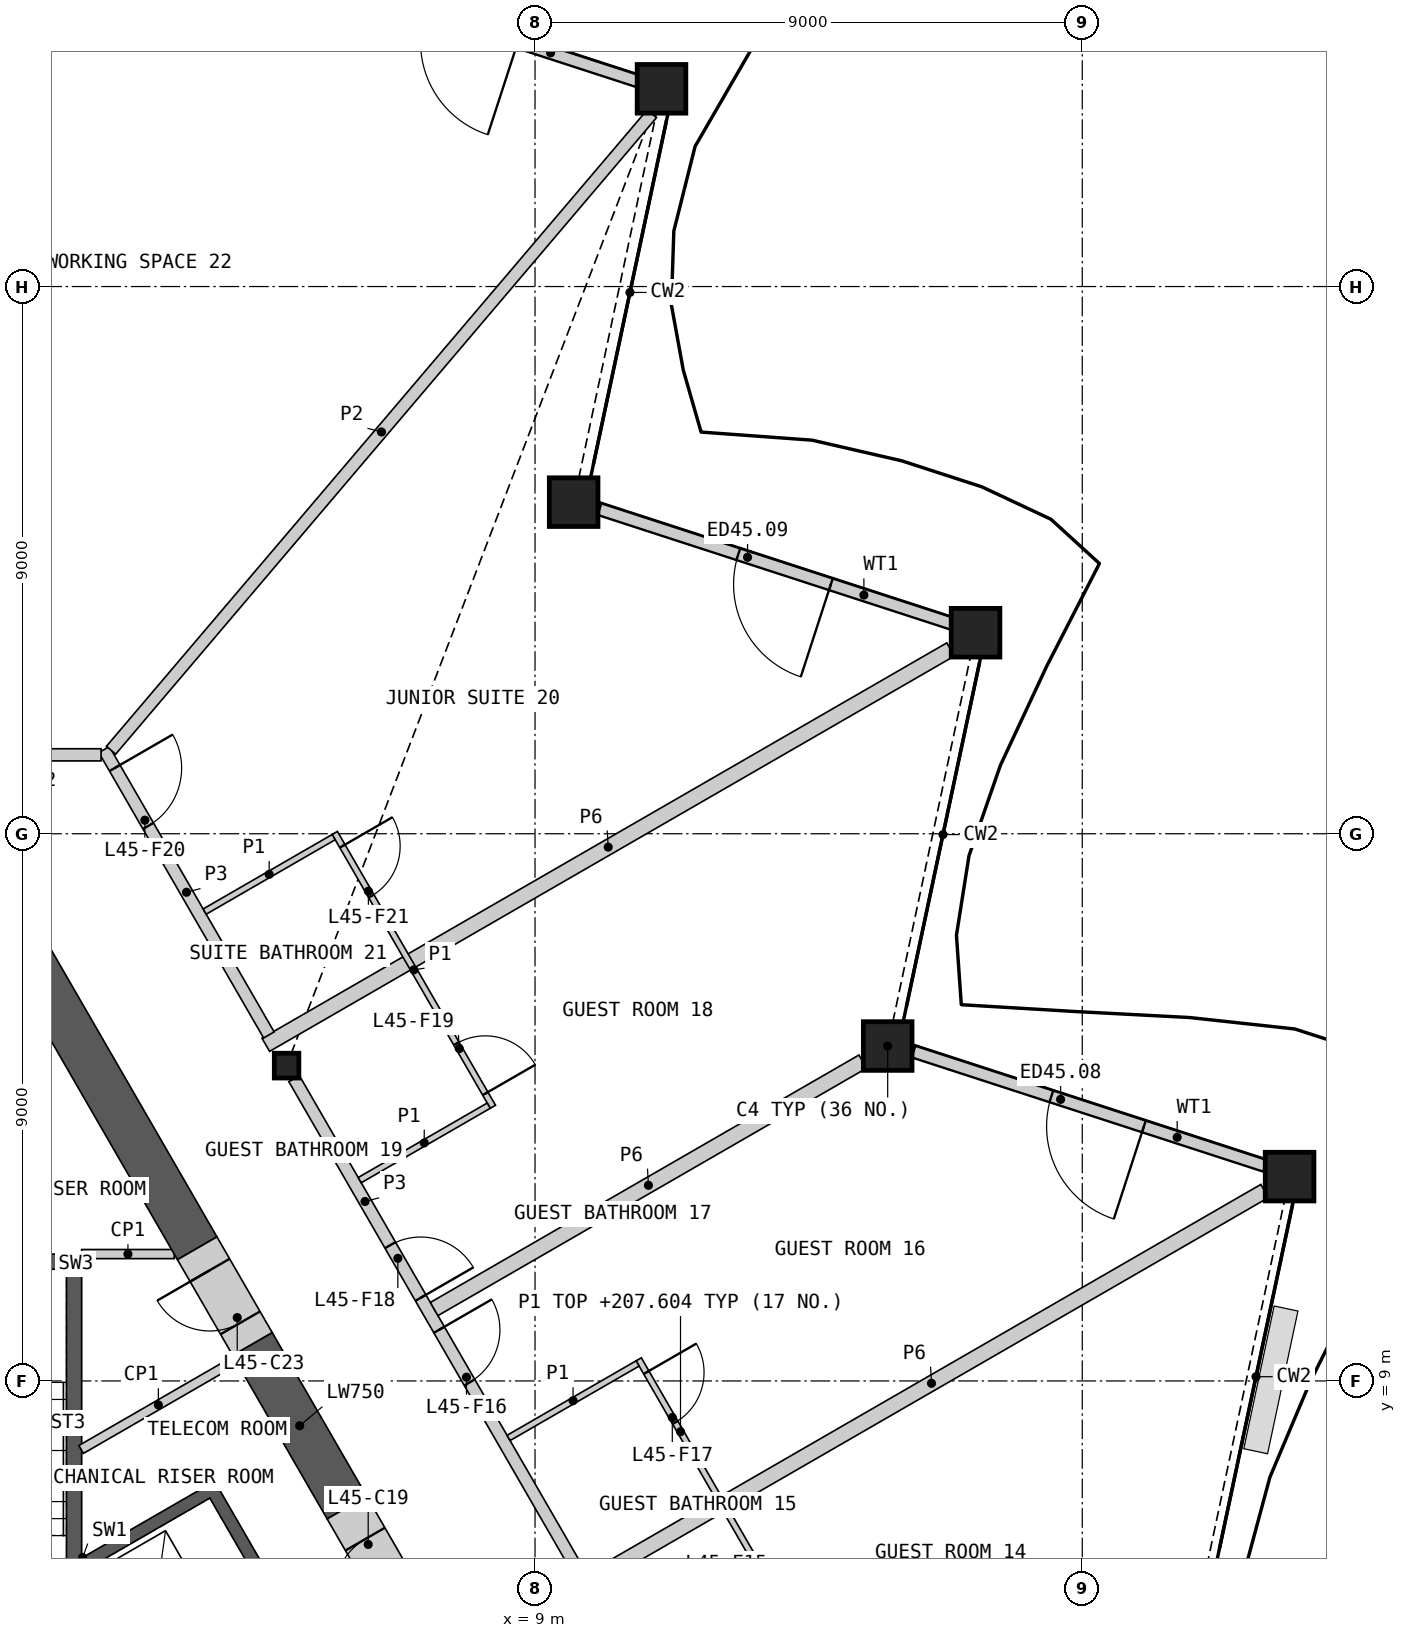
"""IFC4 building model, lengths in metres.
Left out: names, types, materials, properties, quantities, classifications, styles, units other than length and angle.
Written with IfcOpenShell. Run it as: python <this file> out.ifc"""

import sys

from ifc_helpers import new_model, si_unit, direction, frame, frame_2d, origin, origin_2d, place, context, subcontext, project, spatial, polyline, rectangle, hollow_rectangle, i_section, outline, extrude, element, fill, save


model = new_model("IFC4")
c1 = context("Model", 3, precision=1e-05, world=origin(), true_north=direction((0.0, 1.0)))
c2 = subcontext(c1, "Body", "Model", "MODEL_VIEW")
j1 = project(units=[si_unit("LENGTHUNIT", "METRE"), si_unit("PLANEANGLEUNIT", "RADIAN")], contexts=[c1])
p1 = place(None, origin())
s1 = spatial("IfcSite", under=j1, at=p1, CompositionType="ELEMENT")
p2 = place(p1, origin())
s2 = spatial("IfcBuilding", under=s1, at=p2, CompositionType="ELEMENT")
p3 = place(p2, frame((0.0, 0.0, 205.2)))
s3 = spatial("IfcBuildingStorey", under=s2, at=p3, CompositionType="ELEMENT", Elevation=205.2)
for number, where, z_axis, x_axis in (
    (1, (21.409, 12.361, 0.0), (0.0, 0.0, 1.0), (1.0, 0.0, 0.0)),
    (2, (14.8, 14.508, 0.0), (0.0, 0.0, 1.0), (1.0, 0.0, 0.0)),
    (3, (16.245, 21.306, 0.0), (0.0, 0.0, 1.0), (1.0, 0.0, 0.0)),
    (4, (9.635, 23.454, 0.0), (0.0, 0.0, 1.0), (1.0, 0.0, 0.0)),
    (5, (11.08, 30.252, 0.0), (0.0, 0.0, 1.0), (1.0, 0.0, 0.0)),
):
    element("IfcColumn", number, at=place(p3, frame(where, z_axis=z_axis, x_axis=x_axis)), inside=s3, PredefinedType="COLUMN", context=c2, shape_type="SweptSolid", body=[
        extrude(hollow_rectangle(XDim=0.8, YDim=0.8, WallThickness=0.05, at=origin_2d()), origin(), (0.0, 0.0, 1.0), 3.6),
    ])
p4 = place(p3, frame((4.914, 14.186, 0.0), z_axis=(0.0, 0.0, 1.0), x_axis=(1.0, 0.0, 0.0)))
e6 = element("IfcColumn", 6, at=p4, inside=s3, PredefinedType="COLUMN", context=c2, shape_type="SweptSolid", body=[
    extrude(i_section(OverallWidth=0.404, OverallDepth=0.407, WebThickness=0.027, FlangeThickness=0.044, at=origin_2d()), origin(), (0.0, 0.0, 1.0), 3.6),
])
p5 = place(p3, frame((21.006, 12.538, 0.0), z_axis=(0.0, 0.0, 1.0), x_axis=(-0.951049709595, 0.309037942458, 0.0)))
e7 = element("IfcWall", 7, at=p5, inside=s3, PredefinedType="SOLIDWALL", context=c2, shape_type="SweptSolid", body=[
    extrude(rectangle(XDim=6.079, YDim=0.2, at=frame_2d((3.04, 0.0))), origin(), (0.0, 0.0, 1.0), 2.701),
])
p6 = place(p5, frame((2.096, 0.0, 0.0)))
e8 = element("IfcOpeningElement", 8, at=p6, cuts=e7, PredefinedType="OPENING", context=c2, shape_type="SweptSolid", body=[
    extrude(rectangle(XDim=1.6, YDim=2.4, at=frame_2d((0.8, 1.2))), frame((0.0, 0.11, 0.0), z_axis=(0.0, -1.0, 0.0), x_axis=(1.0, 0.0, 0.0)), (0.0, 0.0, 1.0), 0.22),
])
p7 = place(p3, frame((15.858, 21.455, 0.0), z_axis=(0.0, 0.0, 1.0), x_axis=(-0.951066434465, 0.308986467719, 0.0)))
e9 = element("IfcWall", 9, at=p7, inside=s3, PredefinedType="SOLIDWALL", context=c2, shape_type="SweptSolid", body=[
    extrude(rectangle(XDim=6.097, YDim=0.2, at=frame_2d((3.048, 0.0))), origin(), (0.0, 0.0, 1.0), 2.701),
])
p8 = place(p7, frame((2.096, 0.0, 0.0)))
e10 = element("IfcOpeningElement", 10, at=p8, cuts=e9, PredefinedType="OPENING", context=c2, shape_type="SweptSolid", body=[
    extrude(rectangle(XDim=1.6, YDim=2.4, at=frame_2d((0.8, 1.2))), frame((0.0, 0.11, 0.0), z_axis=(0.0, -1.0, 0.0), x_axis=(1.0, 0.0, 0.0)), (0.0, 0.0, 1.0), 0.22),
])
p9 = place(p3, frame((10.71, 30.371, 0.0), z_axis=(0.0, 0.0, 1.0), x_axis=(-0.951055780789, 0.30901925802, 0.0)))
e11 = element("IfcWall", 11, at=p9, inside=s3, PredefinedType="SOLIDWALL", context=c2, shape_type="SweptSolid", body=[
    extrude(rectangle(XDim=6.114, YDim=0.2, at=frame_2d((3.057, 0.0))), origin(), (0.0, 0.0, 1.0), 2.701),
])
p10 = place(p9, frame((2.096, 0.0, 0.0)))
e12 = element("IfcOpeningElement", 12, at=p10, cuts=e11, PredefinedType="OPENING", context=c2, shape_type="SweptSolid", body=[
    extrude(rectangle(XDim=1.6, YDim=2.4, at=frame_2d((0.8, 1.2))), frame((0.0, 0.11, 0.0), z_axis=(0.0, -1.0, 0.0), x_axis=(1.0, 0.0, 0.0)), (0.0, 0.0, 1.0), 0.22),
])
p11 = place(p3, origin())
e13 = element("IfcWall", 13, at=p11, inside=s3, PredefinedType="SHEAR", context=c2, shape_type="SweptSolid", body=[
    extrude(outline(polyline([(1.561, 6.097), (3.731, 7.35), (7.131, 1.461), (4.96, 0.208), (4.861, 0.381), (6.852, 1.531), (4.752, 5.169), (2.76, 4.019), (2.66, 4.192), (4.652, 5.342), (3.652, 7.074), (1.66, 5.924), (1.561, 6.097)])), origin(), (0.0, 0.0, 1.0), 3.25),
])
p12 = place(p3, origin())
e14 = element("IfcWall", 14, at=p12, inside=s3, PredefinedType="SHEAR", context=c2, shape_type="SweptSolid", body=[
    extrude(outline(polyline([(1.544, 5.237), (1.544, 11.087), (1.294, 10.837), (1.294, 5.237), (1.544, 5.237)])), origin(), (0.0, 0.0, 1.0), 3.25),
])
p13 = place(p3, origin())
e15 = element("IfcWall", 15, at=p13, inside=s3, PredefinedType="SHEAR", context=c2, shape_type="SweptSolid", body=[
    extrude(outline(polyline([(1.544, 11.087), (-1.544, 11.087), (-1.294, 10.837), (1.294, 10.837), (1.544, 11.087)])), origin(), (0.0, 0.0, 1.0), 3.25),
])
p14 = place(p3, frame((4.075, 9.339, 0.0), z_axis=(0.0, 0.0, 1.0), x_axis=(-0.865995658863, -0.500051516177, 0.0)))
e16 = element("IfcWall", 16, at=p14, inside=s3, PredefinedType="PARTITIONING", context=c2, shape_type="SweptSolid", body=[
    extrude(rectangle(XDim=2.933, YDim=0.15, at=frame_2d((1.466, 0.0))), origin(), (0.0, 0.0, 1.0), 3.25),
])
p15 = place(p3, frame((1.544, 11.087, 0.0), z_axis=(0.0, 0.0, 1.0), x_axis=(1.0, 0.0, 0.0)))
e17 = element("IfcWall", 17, at=p15, inside=s3, PredefinedType="PARTITIONING", context=c2, shape_type="SweptSolid", body=[
    extrude(rectangle(XDim=1.522, YDim=0.15, at=frame_2d((0.761, 0.0))), origin(), (0.0, 0.0, 1.0), 3.25),
])
p16 = place(p3, frame((3.444, 11.182, 0.0), z_axis=(0.0, 0.0, 1.0), x_axis=(-0.499985517215, 0.866033765263, 0.0)))
e18 = element("IfcWall", 18, at=p16, inside=s3, PredefinedType="SHEAR", context=c2, shape_type="SweptSolid", body=[
    extrude(rectangle(XDim=6.24, YDim=0.75, at=frame_2d((3.12, 0.0))), origin(), (0.0, 0.0, 1.0), 3.25),
])
p17 = place(p3, frame((5.906, 6.918, 0.0), z_axis=(0.0, 0.0, 1.0), x_axis=(-0.500017123375, 0.866015517374, 0.0)))
e19 = element("IfcWall", 19, at=p17, inside=s3, PredefinedType="SHEAR", context=c2, shape_type="SweptSolid", body=[
    extrude(rectangle(XDim=3.108, YDim=0.75, at=frame_2d((1.554, 0.0))), origin(), (0.0, 0.0, 1.0), 3.25),
])
p18 = place(p3, frame((7.006, 5.012, 0.0), z_axis=(0.0, 0.0, 1.0), x_axis=(-0.499946605688, 0.86605622881, 0.0)))
e20 = element("IfcWall", 20, at=p18, inside=s3, PredefinedType="SHEAR", context=c2, shape_type="SweptSolid", body=[
    extrude(rectangle(XDim=2.2, YDim=0.75, at=frame_2d((1.1, 0.0))), origin(), (0.0, 0.0, 1.0), 3.25),
])
p19 = place(p18, frame((0.6, 0.0, 0.0)))
e21 = element("IfcOpeningElement", 21, at=p19, cuts=e20, PredefinedType="OPENING", context=c2, shape_type="SweptSolid", body=[
    extrude(rectangle(XDim=1.0, YDim=2.1, at=frame_2d((0.5, 1.05))), frame((0.0, 0.385, 0.0), z_axis=(0.0, -1.0, 0.0), x_axis=(1.0, 0.0, 0.0)), (0.0, 0.0, 1.0), 0.77),
])
p20 = place(p3, frame((4.353, 9.609, 0.0), z_axis=(0.0, 0.0, 1.0), x_axis=(-0.500071537347, 0.865984097738, 0.0)))
e22 = element("IfcWall", 22, at=p20, inside=s3, PredefinedType="SHEAR", context=c2, shape_type="SweptSolid", body=[
    extrude(rectangle(XDim=1.816, YDim=0.75, at=frame_2d((0.908, 0.0))), origin(), (0.0, 0.0, 1.0), 3.25),
])
p21 = place(p20, frame((0.4, 0.0, 0.0)))
e23 = element("IfcOpeningElement", 23, at=p21, cuts=e22, PredefinedType="OPENING", context=c2, shape_type="SweptSolid", body=[
    extrude(rectangle(XDim=1.0, YDim=2.1, at=frame_2d((0.5, 1.05))), frame((0.0, 0.385, 0.0), z_axis=(0.0, -1.0, 0.0), x_axis=(1.0, 0.0, 0.0)), (0.0, 0.0, 1.0), 0.77),
])
p22 = place(p3, frame((4.572, 14.529, 0.0), z_axis=(0.0, 0.0, 1.0), x_axis=(0.866023333059, 0.500003586584, 0.0)))
e24 = element("IfcWall", 24, at=p22, inside=s3, PredefinedType="PARTITIONING", context=c2, shape_type="SweptSolid", body=[
    extrude(rectangle(XDim=13.005, YDim=0.25, at=frame_2d((6.502, 0.0))), origin(), (0.0, 0.0, 1.0), 2.404),
])
p23 = place(p3, frame((10.042, 5.798, 0.0), z_axis=(0.0, 0.0, 1.0), x_axis=(0.866025883649, 0.499999168849, 0.0)))
e25 = element("IfcWall", 25, at=p23, inside=s3, PredefinedType="PARTITIONING", context=c2, shape_type="SweptSolid", body=[
    extrude(rectangle(XDim=12.652, YDim=0.25, at=frame_2d((6.326, 0.0))), origin(), (0.0, 0.0, 1.0), 2.404),
])
p24 = place(p3, frame((5.038, 13.972, 0.0), z_axis=(0.0, 0.0, 1.0), x_axis=(0.50000393355, -0.866023132736, 0.0)))
e26 = element("IfcWall", 26, at=p24, inside=s3, PredefinedType="PARTITIONING", context=c2, shape_type="SweptSolid", body=[
    extrude(rectangle(XDim=9.335, YDim=0.2, at=frame_2d((4.667, 0.0))), origin(), (0.0, 0.0, 1.0), 3.25),
])
p25 = place(p24, frame((4.77, 0.0, 0.0)))
e27 = element("IfcOpeningElement", 27, at=p25, cuts=e26, PredefinedType="OPENING", context=c2, shape_type="SweptSolid", body=[
    extrude(rectangle(XDim=1.0, YDim=2.1, at=frame_2d((0.5, 1.05))), frame((0.0, 0.11, 0.0), z_axis=(0.0, -1.0, 0.0), x_axis=(1.0, 0.0, 0.0)), (0.0, 0.0, 1.0), 0.22),
])
p26 = place(p24, frame((3.163, 0.0, 0.0)))
e28 = element("IfcOpeningElement", 28, at=p26, cuts=e26, PredefinedType="OPENING", context=c2, shape_type="SweptSolid", body=[
    extrude(rectangle(XDim=1.0, YDim=2.1, at=frame_2d((0.5, 1.05))), frame((0.0, 0.11, 0.0), z_axis=(0.0, -1.0, 0.0), x_axis=(1.0, 0.0, 0.0)), (0.0, 0.0, 1.0), 0.22),
])
p27 = place(p3, frame((7.341, 10.183, 0.0), z_axis=(0.0, 0.0, 1.0), x_axis=(0.866028741424, 0.499994218994, 0.0)))
e29 = element("IfcWall", 29, at=p27, inside=s3, PredefinedType="PARTITIONING", context=c2, shape_type="SweptSolid", body=[
    extrude(rectangle(XDim=8.139, YDim=0.25, at=frame_2d((4.07, 0.0))), origin(), (0.0, 0.0, 1.0), 2.404),
])
p28 = place(p3, frame((1.913, 19.385, 0.0), z_axis=(0.0, 0.0, 1.0), x_axis=(0.499961611314, -0.866047566368, 0.0)))
e30 = element("IfcWall", 30, at=p28, inside=s3, PredefinedType="PARTITIONING", context=c2, shape_type="SweptSolid", body=[
    extrude(rectangle(XDim=5.42, YDim=0.2, at=frame_2d((2.71, 0.0))), origin(), (0.0, 0.0, 1.0), 3.25),
])
p29 = place(p28, frame((0.351, 0.0, 0.0)))
e31 = element("IfcOpeningElement", 31, at=p29, cuts=e30, PredefinedType="OPENING", context=c2, shape_type="SweptSolid", body=[
    extrude(rectangle(XDim=1.1, YDim=2.1, at=frame_2d((0.55, 1.05))), frame((0.0, 0.11, 0.0), z_axis=(0.0, -1.0, 0.0), x_axis=(1.0, 0.0, 0.0)), (0.0, 0.0, 1.0), 0.22),
])
p30 = place(p3, frame((-1.863, 19.298, 0.0), z_axis=(0.0, 0.0, 1.0), x_axis=(1.0, 0.0, 0.0)))
e32 = element("IfcWall", 32, at=p30, inside=s3, PredefinedType="PARTITIONING", context=c2, shape_type="SweptSolid", body=[
    extrude(rectangle(XDim=3.726, YDim=0.2, at=frame_2d((1.863, 0.0))), origin(), (0.0, 0.0, 1.0), 3.25),
])
p31 = place(p30, frame((0.963, 0.0, 0.0)))
e33 = element("IfcOpeningElement", 33, at=p31, cuts=e32, PredefinedType="OPENING", context=c2, shape_type="SweptSolid", body=[
    extrude(rectangle(XDim=1.8, YDim=2.1, at=frame_2d((0.9, 1.05))), frame((0.0, 0.11, 0.0), z_axis=(0.0, -1.0, 0.0), x_axis=(1.0, 0.0, 0.0)), (0.0, 0.0, 1.0), 0.22),
])
p32 = place(p3, frame((2.028, 19.374, 0.0), z_axis=(0.0, 0.0, 1.0), x_axis=(0.647497756192, 0.762067356423, 0.0)))
e34 = element("IfcWall", 34, at=p32, inside=s3, PredefinedType="PARTITIONING", context=c2, shape_type="SweptSolid", body=[
    extrude(rectangle(XDim=13.736, YDim=0.2, at=frame_2d((6.868, 0.0))), origin(), (0.0, 0.0, 1.0), 2.404),
])
p33 = place(p3, frame((10.705, 9.356, 0.0), z_axis=(0.0, 0.0, 1.0), x_axis=(0.500015767406, -0.866016300277, 0.0)))
e35 = element("IfcWall", 35, at=p33, inside=s3, PredefinedType="PARTITIONING", context=c2, shape_type="SweptSolid", body=[
    extrude(rectangle(XDim=5.5, YDim=0.1, at=frame_2d((2.75, 0.0))), origin(), (0.0, 0.0, 1.0), 2.404),
])
p34 = place(p33, frame((4.3, 0.0, 0.0)))
e36 = element("IfcOpeningElement", 36, at=p34, cuts=e35, PredefinedType="OPENING", context=c2, shape_type="SweptSolid", body=[
    extrude(rectangle(XDim=0.95, YDim=2.1, at=frame_2d((0.475, 1.05))), frame((0.0, 0.06, 0.0), z_axis=(0.0, -1.0, 0.0), x_axis=(1.0, 0.0, 0.0)), (0.0, 0.0, 1.0), 0.12),
])
p35 = place(p33, frame((0.25, 0.0, 0.0)))
e37 = element("IfcOpeningElement", 37, at=p35, cuts=e35, PredefinedType="OPENING", context=c2, shape_type="SweptSolid", body=[
    extrude(rectangle(XDim=0.95, YDim=2.1, at=frame_2d((0.475, 1.05))), frame((0.0, 0.06, 0.0), z_axis=(0.0, -1.0, 0.0), x_axis=(1.0, 0.0, 0.0)), (0.0, 0.0, 1.0), 0.12),
])
p36 = place(p3, frame((5.707, 18.013, 0.0), z_axis=(0.0, 0.0, 1.0), x_axis=(0.500006934395, -0.866021400173, 0.0)))
e38 = element("IfcWall", 38, at=p36, inside=s3, PredefinedType="PARTITIONING", context=c2, shape_type="SweptSolid", body=[
    extrude(rectangle(XDim=5.2, YDim=0.1, at=frame_2d((2.6, 0.0))), origin(), (0.0, 0.0, 1.0), 2.404),
])
p37 = place(p36, frame((4.0, 0.0, 0.0)))
e39 = element("IfcOpeningElement", 39, at=p37, cuts=e38, PredefinedType="OPENING", context=c2, shape_type="SweptSolid", body=[
    extrude(rectangle(XDim=0.95, YDim=2.1, at=frame_2d((0.475, 1.05))), frame((0.0, 0.06, 0.0), z_axis=(0.0, -1.0, 0.0), x_axis=(1.0, 0.0, 0.0)), (0.0, 0.0, 1.0), 0.12),
])
p38 = place(p36, frame((0.25, 0.0, 0.0)))
e40 = element("IfcOpeningElement", 40, at=p38, cuts=e38, PredefinedType="OPENING", context=c2, shape_type="SweptSolid", body=[
    extrude(rectangle(XDim=0.95, YDim=2.1, at=frame_2d((0.475, 1.05))), frame((0.0, 0.06, 0.0), z_axis=(0.0, -1.0, 0.0), x_axis=(1.0, 0.0, 0.0)), (0.0, 0.0, 1.0), 0.12),
])
for number, where, z_axis, x_axis in (
    (41, (6.117, 12.303, 0.0), (0.0, 0.0, 1.0), (0.866, 0.5, 0.0)),
    (42, (3.567, 16.719, 0.0), (0.0, 0.0, 1.0), (0.866, 0.5, 0.0)),
):
    element("IfcWall", number, at=place(p3, frame(where, z_axis=z_axis, x_axis=x_axis)), inside=s3, PredefinedType="PARTITIONING", context=c2, shape_type="SweptSolid", body=[
        extrude(rectangle(XDim=2.45, YDim=0.1, at=frame_2d((1.225, 0.0))), origin(), (0.0, 0.0, 1.0), 2.404),
    ])
p39 = place(p3, frame((8.565, 8.063, 0.0), z_axis=(0.0, 0.0, 1.0), x_axis=(0.866032905446, 0.499987006516, 0.0)))
e43 = element("IfcWall", 43, at=p39, inside=s3, PredefinedType="PARTITIONING", context=c2, shape_type="SweptSolid", body=[
    extrude(rectangle(XDim=2.45, YDim=0.1, at=frame_2d((1.225, 0.0))), origin(), (0.0, 0.0, 1.0), 2.404),
])
p40 = place(p6, origin())
e44 = element("IfcDoor", 44, at=p40, inside=s3, OperationType="DOUBLE_DOOR_SINGLE_SWING", PredefinedType="DOOR", context=c2, shape_type="SweptSolid", body=[
    extrude(rectangle(XDim=1.6, YDim=2.4, at=frame_2d((0.8, 1.2))), frame((0.0, 0.025, 0.0), z_axis=(0.0, -1.0, 0.0), x_axis=(1.0, 0.0, 0.0)), (0.0, 0.0, 1.0), 0.05),
])
fill(e8, e44)
p41 = place(p8, origin())
e45 = element("IfcDoor", 45, at=p41, inside=s3, OperationType="DOUBLE_DOOR_SINGLE_SWING", PredefinedType="DOOR", context=c2, shape_type="SweptSolid", body=[
    extrude(rectangle(XDim=1.6, YDim=2.4, at=frame_2d((0.8, 1.2))), frame((0.0, 0.025, 0.0), z_axis=(0.0, -1.0, 0.0), x_axis=(1.0, 0.0, 0.0)), (0.0, 0.0, 1.0), 0.05),
])
fill(e10, e45)
p42 = place(p19, origin())
e46 = element("IfcDoor", 46, at=p42, inside=s3, OperationType="SINGLE_SWING_LEFT", PredefinedType="DOOR", context=c2, shape_type="SweptSolid", body=[
    extrude(rectangle(XDim=1.0, YDim=2.1, at=frame_2d((0.5, 1.05))), frame((0.0, 0.13, 0.0), z_axis=(0.0, -1.0, 0.0), x_axis=(1.0, 0.0, 0.0)), (0.0, 0.0, 1.0), 0.05),
])
fill(e21, e46)
p43 = place(p21, origin())
e47 = element("IfcDoor", 47, at=p43, inside=s3, OperationType="SINGLE_SWING_RIGHT", PredefinedType="DOOR", context=c2, shape_type="SweptSolid", body=[
    extrude(rectangle(XDim=1.0, YDim=2.1, at=frame_2d((0.5, 1.05))), frame((0.0, 0.13, 0.0), z_axis=(0.0, -1.0, 0.0), x_axis=(1.0, 0.0, 0.0)), (0.0, 0.0, 1.0), 0.05),
])
fill(e23, e47)
p44 = place(p25, origin())
e48 = element("IfcDoor", 48, at=p44, inside=s3, OperationType="SINGLE_SWING_LEFT", PredefinedType="DOOR", context=c2, shape_type="SweptSolid", body=[
    extrude(rectangle(XDim=1.0, YDim=2.1, at=frame_2d((0.5, 1.05))), frame((0.0, 0.025, 0.0), z_axis=(0.0, -1.0, 0.0), x_axis=(1.0, 0.0, 0.0)), (0.0, 0.0, 1.0), 0.05),
])
fill(e27, e48)
p45 = place(p35, origin())
e49 = element("IfcDoor", 49, at=p45, inside=s3, OperationType="SINGLE_SWING_LEFT", PredefinedType="DOOR", context=c2, shape_type="SweptSolid", body=[
    extrude(rectangle(XDim=0.95, YDim=2.1, at=frame_2d((0.475, 1.05))), frame((0.0, 0.025, 0.0), z_axis=(0.0, -1.0, 0.0), x_axis=(1.0, 0.0, 0.0)), (0.0, 0.0, 1.0), 0.05),
])
fill(e37, e49)
p46 = place(p26, origin())
e50 = element("IfcDoor", 50, at=p46, inside=s3, OperationType="SINGLE_SWING_RIGHT", PredefinedType="DOOR", context=c2, shape_type="SweptSolid", body=[
    extrude(rectangle(XDim=1.0, YDim=2.1, at=frame_2d((0.5, 1.05))), frame((0.0, 0.025, 0.0), z_axis=(0.0, -1.0, 0.0), x_axis=(1.0, 0.0, 0.0)), (0.0, 0.0, 1.0), 0.05),
])
fill(e28, e50)
p47 = place(p37, origin())
e51 = element("IfcDoor", 51, at=p47, inside=s3, OperationType="SINGLE_SWING_RIGHT", PredefinedType="DOOR", context=c2, shape_type="SweptSolid", body=[
    extrude(rectangle(XDim=0.95, YDim=2.1, at=frame_2d((0.475, 1.05))), frame((0.0, 0.025, 0.0), z_axis=(0.0, -1.0, 0.0), x_axis=(1.0, 0.0, 0.0)), (0.0, 0.0, 1.0), 0.05),
])
fill(e39, e51)
p48 = place(p29, origin())
e52 = element("IfcDoor", 52, at=p48, inside=s3, OperationType="SINGLE_SWING_LEFT", PredefinedType="DOOR", context=c2, shape_type="SweptSolid", body=[
    extrude(rectangle(XDim=1.1, YDim=2.1, at=frame_2d((0.55, 1.05))), frame((0.0, 0.025, 0.0), z_axis=(0.0, -1.0, 0.0), x_axis=(1.0, 0.0, 0.0)), (0.0, 0.0, 1.0), 0.05),
])
fill(e31, e52)
p49 = place(p38, origin())
e53 = element("IfcDoor", 53, at=p49, inside=s3, OperationType="SINGLE_SWING_LEFT", PredefinedType="DOOR", context=c2, shape_type="SweptSolid", body=[
    extrude(rectangle(XDim=0.95, YDim=2.1, at=frame_2d((0.475, 1.05))), frame((0.0, 0.025, 0.0), z_axis=(0.0, -1.0, 0.0), x_axis=(1.0, 0.0, 0.0)), (0.0, 0.0, 1.0), 0.05),
])
fill(e40, e53)
save(model, sys.argv[1])
